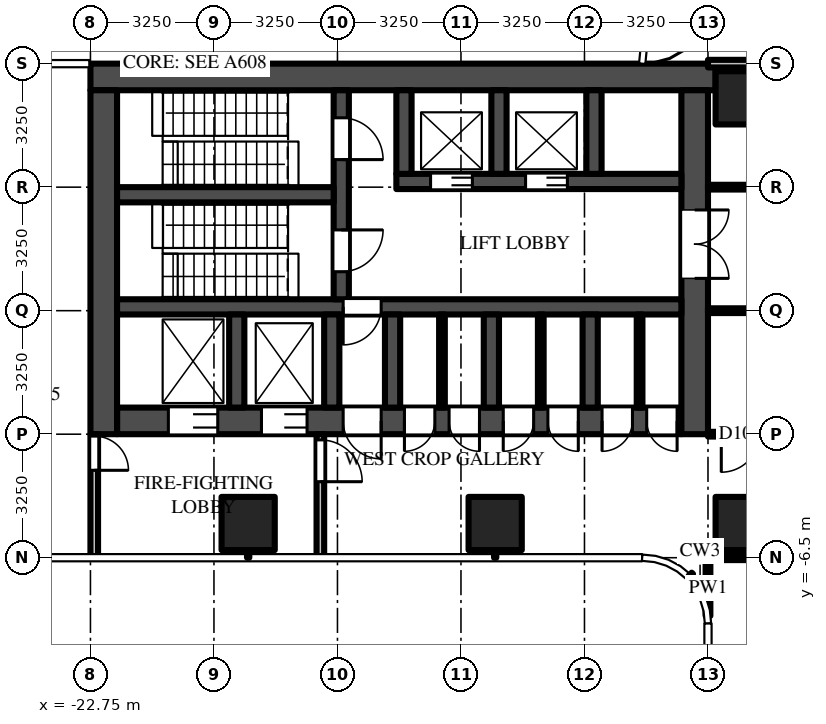
"""IFC4 building model, lengths in metres.
Left out: names, types, materials, properties, quantities, classifications, styles, units other than length and angle.
Written with IfcOpenShell. Run it as: python <this file> out.ifc"""

import sys

from ifc_helpers import new_model, si_unit, direction, frame, frame_2d, origin, origin_2d, place, context, subcontext, project, spatial, rectangle, extrude, source, transform, mapped, element, fill, save


model = new_model("IFC4")
c1 = context("Model", 3, precision=1e-05, world=origin(), true_north=direction((0.0, 1.0)))
c2 = subcontext(c1, "Body", "Model", "MODEL_VIEW")
j1 = project(units=[si_unit("LENGTHUNIT", "METRE"), si_unit("PLANEANGLEUNIT", "RADIAN")], contexts=[c1])
p1 = place(None, origin())
s1 = spatial("IfcSite", under=j1, at=p1, CompositionType="ELEMENT")
p2 = place(p1, origin())
s2 = spatial("IfcBuilding", under=s1, at=p2, CompositionType="ELEMENT")
p3 = place(p2, frame((0.0, 0.0, 47.5)))
s3 = spatial("IfcBuildingStorey", under=s2, at=p3, CompositionType="ELEMENT", Elevation=47.5)
m1 = source(origin(), c2, "Body", "SweptSolid", [
    extrude(rectangle(XDim=1.4, YDim=1.4, at=origin_2d()), origin(), (0.0, 0.0, 1.0), 4.5),
])
for number, where, z_axis, x_axis in (
    (1, (-5.6, 5.6, 0.0), (0.0, 0.0, 1.0), (1.0, 0.0, 0.0)),
    (2, (-5.6, -5.6, 0.0), (0.0, 0.0, 1.0), (1.0, 0.0, 0.0)),
    (3, (-12.1, -5.6, 0.0), (0.0, 0.0, 1.0), (1.0, 0.0, 0.0)),
    (4, (-18.6, -5.6, 0.0), (0.0, 0.0, 1.0), (1.0, 0.0, 0.0)),
):
    element("IfcColumn", number, at=place(p3, frame(where, z_axis=z_axis, x_axis=x_axis)), inside=s3, PredefinedType="COLUMN", context=c2, shape_type="MappedRepresentation", body=[
        mapped(m1, transform((0.0, 0.0, 0.0))),
    ])
m2 = source(origin(), c2, "Body", "SweptSolid", [
    extrude(rectangle(XDim=16.45, YDim=0.7, at=frame_2d((8.225, 0.0))), origin(), (0.0, 0.0, 1.0), 4.25),
])
p4 = place(p3, frame((-6.3, 6.15, 0.0), z_axis=(0.0, 0.0, 1.0), x_axis=(-1.0, 0.0, 0.0)))
e5 = element("IfcWall", 5, at=p4, inside=s3, PredefinedType="SHEAR", context=c2, shape_type="MappedRepresentation", body=[
    mapped(m2, transform((0.0, 0.0, 0.0))),
])
m3 = source(origin(), c2, "Body", "SweptSolid", [
    extrude(rectangle(XDim=14.85, YDim=0.7, at=frame_2d((7.425, 0.0))), origin(), (0.0, 0.0, 1.0), 4.25),
])
p5 = place(p3, frame((-7.2, -2.9, 0.0), z_axis=(0.0, 0.0, 1.0), x_axis=(-1.0, 0.0, 0.0)))
e6 = element("IfcWall", 6, at=p5, inside=s3, PredefinedType="SHEAR", context=c2, shape_type="MappedRepresentation", body=[
    mapped(m3, transform((0.0, 0.0, 0.0))),
])
m4 = source(origin(), c2, "Body", "SweptSolid", [
    extrude(rectangle(XDim=1.3, YDim=2.1, at=frame_2d((0.65, 1.05))), frame((0.0, 0.36, 0.0), z_axis=(0.0, -1.0, 0.0), x_axis=(1.0, 0.0, 0.0)), (0.0, 0.0, 1.0), 0.72),
])
p6 = place(p5, frame((12.2, 0.0, 0.0)))
e7 = element("IfcOpeningElement", 7, at=p6, cuts=e6, PredefinedType="OPENING", context=c2, shape_type="MappedRepresentation", body=[
    mapped(m4, transform((0.0, 0.0, 0.0))),
])
m5 = source(origin(), c2, "Body", "SweptSolid", [
    extrude(rectangle(XDim=1.2, YDim=2.1, at=frame_2d((0.6, 1.05))), frame((0.0, 0.36, 0.0), z_axis=(0.0, -1.0, 0.0), x_axis=(1.0, 0.0, 0.0)), (0.0, 0.0, 1.0), 0.72),
])
p7 = place(p5, frame((9.85, 0.0, 0.0)))
e8 = element("IfcOpeningElement", 8, at=p7, cuts=e6, PredefinedType="OPENING", context=c2, shape_type="MappedRepresentation", body=[
    mapped(m5, transform((0.0, 0.0, 0.0))),
])
m6 = source(origin(), c2, "Body", "SweptSolid", [
    extrude(rectangle(XDim=1.0, YDim=2.1, at=frame_2d((0.5, 1.05))), frame((0.0, 0.36, 0.0), z_axis=(0.0, -1.0, 0.0), x_axis=(1.0, 0.0, 0.0)), (0.0, 0.0, 1.0), 0.72),
])
p8 = place(p5, frame((7.9, 0.0, 0.0)))
e9 = element("IfcOpeningElement", 9, at=p8, cuts=e6, PredefinedType="OPENING", context=c2, shape_type="MappedRepresentation", body=[
    mapped(m6, transform((0.0, 0.0, 0.0))),
])
m7 = source(origin(), c2, "Body", "SweptSolid", [
    extrude(rectangle(XDim=0.8, YDim=2.1, at=frame_2d((0.4, 1.05))), frame((0.0, 0.36, 0.0), z_axis=(0.0, -1.0, 0.0), x_axis=(1.0, 0.0, 0.0)), (0.0, 0.0, 1.0), 0.72),
])
p9 = place(p5, frame((0.113, 0.0, 0.0)))
e10 = element("IfcOpeningElement", 10, at=p9, cuts=e6, PredefinedType="OPENING", context=c2, shape_type="MappedRepresentation", body=[
    mapped(m7, transform((0.0, 0.0, 0.0))),
])
p10 = place(p5, frame((1.288, 0.0, 0.0)))
e11 = element("IfcOpeningElement", 11, at=p10, cuts=e6, PredefinedType="OPENING", context=c2, shape_type="MappedRepresentation", body=[
    mapped(m7, transform((0.0, 0.0, 0.0))),
])
p11 = place(p5, frame((2.712, 0.0, 0.0)))
e12 = element("IfcOpeningElement", 12, at=p11, cuts=e6, PredefinedType="OPENING", context=c2, shape_type="MappedRepresentation", body=[
    mapped(m7, transform((0.0, 0.0, 0.0))),
])
p12 = place(p5, frame((3.887, 0.0, 0.0)))
e13 = element("IfcOpeningElement", 13, at=p12, cuts=e6, PredefinedType="OPENING", context=c2, shape_type="MappedRepresentation", body=[
    mapped(m7, transform((0.0, 0.0, 0.0))),
])
p13 = place(p5, frame((5.312, 0.0, 0.0)))
e14 = element("IfcOpeningElement", 14, at=p13, cuts=e6, PredefinedType="OPENING", context=c2, shape_type="MappedRepresentation", body=[
    mapped(m7, transform((0.0, 0.0, 0.0))),
])
p14 = place(p5, frame((6.488, 0.0, 0.0)))
e15 = element("IfcOpeningElement", 15, at=p14, cuts=e6, PredefinedType="OPENING", context=c2, shape_type="MappedRepresentation", body=[
    mapped(m7, transform((0.0, 0.0, 0.0))),
])
m8 = source(origin(), c2, "Body", "SweptSolid", [
    extrude(rectangle(XDim=9.05, YDim=0.7, at=frame_2d((4.525, 0.0))), origin(), (0.0, 0.0, 1.0), 4.25),
])
p15 = place(p3, frame((-6.85, 5.8, 0.0), z_axis=(0.0, 0.0, 1.0), x_axis=(0.0, -1.0, 0.0)))
e16 = element("IfcWall", 16, at=p15, inside=s3, PredefinedType="SHEAR", context=c2, shape_type="MappedRepresentation", body=[
    mapped(m8, transform((0.0, 0.0, 0.0))),
])
m9 = source(origin(), c2, "Body", "SweptSolid", [
    extrude(rectangle(XDim=1.8, YDim=2.1, at=frame_2d((0.9, 1.05))), frame((0.0, 0.36, 0.0), z_axis=(0.0, -1.0, 0.0), x_axis=(1.0, 0.0, 0.0)), (0.0, 0.0, 1.0), 0.72),
])
p16 = place(p15, frame((3.15, 0.0, 0.0)))
e17 = element("IfcOpeningElement", 17, at=p16, cuts=e16, PredefinedType="OPENING", context=c2, shape_type="MappedRepresentation", body=[
    mapped(m9, transform((0.0, 0.0, 0.0))),
])
p17 = place(p3, frame((-22.4, 5.8, 0.0), z_axis=(0.0, 0.0, 1.0), x_axis=(0.0, -1.0, 0.0)))
e18 = element("IfcWall", 18, at=p17, inside=s3, PredefinedType="SHEAR", context=c2, shape_type="MappedRepresentation", body=[
    mapped(m8, transform((0.0, 0.0, 0.0))),
])
m10 = source(origin(), c2, "Body", "SweptSolid", [
    extrude(rectangle(XDim=7.5, YDim=0.4, at=frame_2d((3.75, 0.0))), origin(), (0.0, 0.0, 1.0), 4.25),
])
p18 = place(p3, frame((-7.2, 3.4, 0.0), z_axis=(0.0, 0.0, 1.0), x_axis=(-1.0, 0.0, 0.0)))
e19 = element("IfcWall", 19, at=p18, inside=s3, PredefinedType="SHEAR", context=c2, shape_type="MappedRepresentation", body=[
    mapped(m10, transform((0.0, 0.0, 0.0))),
])
m11 = source(origin(), c2, "Body", "SweptSolid", [
    extrude(rectangle(XDim=1.1, YDim=2.1, at=frame_2d((0.55, 1.05))), frame((0.0, 0.21, 0.0), z_axis=(0.0, -1.0, 0.0), x_axis=(1.0, 0.0, 0.0)), (0.0, 0.0, 1.0), 0.42),
])
p19 = place(p18, frame((3.0, 0.0, 0.0)))
e20 = element("IfcOpeningElement", 20, at=p19, cuts=e19, PredefinedType="OPENING", context=c2, shape_type="MappedRepresentation", body=[
    mapped(m11, transform((0.0, 0.0, 0.0))),
])
p20 = place(p18, frame((5.5, 0.0, 0.0)))
e21 = element("IfcOpeningElement", 21, at=p20, cuts=e19, PredefinedType="OPENING", context=c2, shape_type="MappedRepresentation", body=[
    mapped(m11, transform((0.0, 0.0, 0.0))),
])
m12 = source(origin(), c2, "Body", "SweptSolid", [
    extrude(rectangle(XDim=14.85, YDim=0.4, at=frame_2d((7.425, 0.0))), origin(), (0.0, 0.0, 1.0), 4.25),
])
p21 = place(p3, frame((-7.2, 0.1, 0.0), z_axis=(0.0, 0.0, 1.0), x_axis=(-1.0, 0.0, 0.0)))
e22 = element("IfcWall", 22, at=p21, inside=s3, PredefinedType="SHEAR", context=c2, shape_type="MappedRepresentation", body=[
    mapped(m12, transform((0.0, 0.0, 0.0))),
])
m13 = source(origin(), c2, "Body", "SweptSolid", [
    extrude(rectangle(XDim=1.0, YDim=2.1, at=frame_2d((0.5, 1.05))), frame((0.0, 0.21, 0.0), z_axis=(0.0, -1.0, 0.0), x_axis=(1.0, 0.0, 0.0)), (0.0, 0.0, 1.0), 0.42),
])
p22 = place(p21, frame((7.9, 0.0, 0.0)))
e23 = element("IfcOpeningElement", 23, at=p22, cuts=e22, PredefinedType="OPENING", context=c2, shape_type="MappedRepresentation", body=[
    mapped(m13, transform((0.0, 0.0, 0.0))),
])
m14 = source(origin(), c2, "Body", "SweptSolid", [
    extrude(rectangle(XDim=5.5, YDim=0.4, at=frame_2d((2.75, 0.0))), origin(), (0.0, 0.0, 1.0), 4.25),
])
p23 = place(p3, frame((-16.15, 5.8, 0.0), z_axis=(0.0, 0.0, 1.0), x_axis=(0.0, -1.0, 0.0)))
e24 = element("IfcWall", 24, at=p23, inside=s3, PredefinedType="SHEAR", context=c2, shape_type="MappedRepresentation", body=[
    mapped(m14, transform((0.0, 0.0, 0.0))),
])
p24 = place(p23, frame((0.725, 0.0, 0.0)))
e25 = element("IfcOpeningElement", 25, at=p24, cuts=e24, PredefinedType="OPENING", context=c2, shape_type="MappedRepresentation", body=[
    mapped(m11, transform((0.0, 0.0, 0.0))),
])
p25 = place(p23, frame((3.675, 0.0, 0.0)))
e26 = element("IfcOpeningElement", 26, at=p25, cuts=e24, PredefinedType="OPENING", context=c2, shape_type="MappedRepresentation", body=[
    mapped(m11, transform((0.0, 0.0, 0.0))),
])
m15 = source(origin(), c2, "Body", "SweptSolid", [
    extrude(rectangle(XDim=5.7, YDim=0.4, at=frame_2d((2.85, 0.0))), origin(), (0.0, 0.0, 1.0), 4.25),
])
p26 = place(p3, frame((-16.35, 3.05, 0.0), z_axis=(0.0, 0.0, 1.0), x_axis=(-1.0, 0.0, 0.0)))
e27 = element("IfcWall", 27, at=p26, inside=s3, PredefinedType="SHEAR", context=c2, shape_type="MappedRepresentation", body=[
    mapped(m15, transform((0.0, 0.0, 0.0))),
])
m16 = source(origin(), c2, "Body", "SweptSolid", [
    extrude(rectangle(XDim=2.2, YDim=0.4, at=frame_2d((1.1, 0.0))), origin(), (0.0, 0.0, 1.0), 4.25),
])
for number, where, z_axis, x_axis in (
    (28, (-9.5, 5.8, 0.0), (0.0, 0.0, 1.0), (0.0, -1.0, 0.0)),
    (29, (-12.0, 5.8, 0.0), (0.0, 0.0, 1.0), (0.0, -1.0, 0.0)),
    (30, (-14.5, 5.8, 0.0), (0.0, 0.0, 1.0), (0.0, -1.0, 0.0)),
):
    element("IfcWall", number, at=place(p3, frame(where, z_axis=z_axis, x_axis=x_axis)), inside=s3, PredefinedType="SHEAR", context=c2, shape_type="MappedRepresentation", body=[
        mapped(m16, transform((0.0, 0.0, 0.0))),
    ])
m17 = source(origin(), c2, "Body", "SweptSolid", [
    extrude(rectangle(XDim=2.45, YDim=0.4, at=frame_2d((1.225, 0.0))), origin(), (0.0, 0.0, 1.0), 4.25),
])
for number, where, z_axis, x_axis in (
    (31, (-9.6, -0.1, 0.0), (0.0, 0.0, 1.0), (0.0, -1.0, 0.0)),
    (32, (-12.2, -0.1, 0.0), (0.0, 0.0, 1.0), (0.0, -1.0, 0.0)),
    (33, (-14.8, -0.1, 0.0), (0.0, 0.0, 1.0), (0.0, -1.0, 0.0)),
    (34, (-16.4, -0.1, 0.0), (0.0, 0.0, 1.0), (0.0, -1.0, 0.0)),
    (35, (-18.9, -0.1, 0.0), (0.0, 0.0, 1.0), (0.0, -1.0, 0.0)),
):
    element("IfcWall", number, at=place(p3, frame(where, z_axis=z_axis, x_axis=x_axis)), inside=s3, PredefinedType="SHEAR", context=c2, shape_type="MappedRepresentation", body=[
        mapped(m17, transform((0.0, 0.0, 0.0))),
    ])
m18 = source(origin(), c2, "Body", "SweptSolid", [
    extrude(rectangle(XDim=3.25, YDim=0.2, at=frame_2d((1.625, 0.0))), origin(), (0.0, 0.0, 1.0), 4.25),
])
p27 = place(p3, frame((-16.7, -3.25, 0.0), z_axis=(0.0, 0.0, 1.0), x_axis=(0.0, -1.0, 0.0)))
e36 = element("IfcWall", 36, at=p27, inside=s3, PredefinedType="PARTITIONING", context=c2, shape_type="MappedRepresentation", body=[
    mapped(m18, transform((0.0, 0.0, 0.0))),
])
m19 = source(origin(), c2, "Body", "SweptSolid", [
    extrude(rectangle(XDim=1.1, YDim=2.1, at=frame_2d((0.55, 1.05))), frame((0.0, 0.11, 0.0), z_axis=(0.0, -1.0, 0.0), x_axis=(1.0, 0.0, 0.0)), (0.0, 0.0, 1.0), 0.22),
])
p28 = place(p27, frame((0.15, 0.0, 0.0)))
e37 = element("IfcOpeningElement", 37, at=p28, cuts=e36, PredefinedType="OPENING", context=c2, shape_type="MappedRepresentation", body=[
    mapped(m19, transform((0.0, 0.0, 0.0))),
])
p29 = place(p3, frame((-22.65, -3.25, 0.0), z_axis=(0.0, 0.0, 1.0), x_axis=(0.0, -1.0, 0.0)))
e38 = element("IfcWall", 38, at=p29, inside=s3, PredefinedType="PARTITIONING", context=c2, shape_type="MappedRepresentation", body=[
    mapped(m18, transform((0.0, 0.0, 0.0))),
])
m20 = source(origin(), c2, "Body", "SweptSolid", [
    extrude(rectangle(XDim=0.9, YDim=2.1, at=frame_2d((0.45, 1.05))), frame((0.0, 0.11, 0.0), z_axis=(0.0, -1.0, 0.0), x_axis=(1.0, 0.0, 0.0)), (0.0, 0.0, 1.0), 0.22),
])
p30 = place(p29, frame((0.05, 0.0, 0.0)))
e39 = element("IfcOpeningElement", 39, at=p30, cuts=e38, PredefinedType="OPENING", context=c2, shape_type="MappedRepresentation", body=[
    mapped(m20, transform((0.0, 0.0, 0.0))),
])
m21 = source(origin(), c2, "Body", "SweptSolid", [
    extrude(rectangle(XDim=2.45, YDim=0.15, at=frame_2d((1.225, 0.0))), origin(), (0.0, 0.0, 1.0), 4.25),
])
for number, where, z_axis, x_axis in (
    (40, (-8.3, -0.1, 0.0), (0.0, 0.0, 1.0), (0.0, -1.0, 0.0)),
    (41, (-10.9, -0.1, 0.0), (0.0, 0.0, 1.0), (0.0, -1.0, 0.0)),
    (42, (-13.5, -0.1, 0.0), (0.0, 0.0, 1.0), (0.0, -1.0, 0.0)),
):
    element("IfcWall", number, at=place(p3, frame(where, z_axis=z_axis, x_axis=x_axis)), inside=s3, PredefinedType="PARTITIONING", context=c2, shape_type="MappedRepresentation", body=[
        mapped(m21, transform((0.0, 0.0, 0.0))),
    ])
m22 = source(origin(), c2, "Body", "SweptSolid", [
    extrude(rectangle(XDim=1.469, YDim=0.125, at=frame_2d((0.734, 0.0))), origin(), (0.0, 0.0, 1.0), 4.25),
])
p31 = place(p3, frame((-6.5, -6.562, 0.0), z_axis=(0.0, 0.0, 1.0), x_axis=(0.0, -1.0, 0.0)))
e43 = element("IfcWall", 43, at=p31, inside=s3, PredefinedType="PARTITIONING", context=c2, shape_type="MappedRepresentation", body=[
    mapped(m22, transform((0.0, 0.0, 0.0))),
])
m23 = source(origin(), c2, "Body", "SweptSolid", [
    extrude(rectangle(XDim=5.425, YDim=0.125, at=frame_2d((2.712, 0.0))), origin(), (0.0, 0.0, 1.0), 3.33),
])
p32 = place(p3, frame((-1.137, -6.5, 0.0), z_axis=(0.0, 0.0, 1.0), x_axis=(-1.0, 0.0, 0.0)))
e44 = element("IfcWall", 44, at=p32, inside=s3, PredefinedType="PARTITIONING", context=c2, shape_type="MappedRepresentation", body=[
    mapped(m23, transform((0.0, 0.0, 0.0))),
])
m24 = source(origin(), c2, "Body", "SweptSolid", [
    extrude(rectangle(XDim=1.0, YDim=2.1, at=frame_2d((0.5, 1.05))), frame((0.0, 0.073, 0.0), z_axis=(0.0, -1.0, 0.0), x_axis=(1.0, 0.0, 0.0)), (0.0, 0.0, 1.0), 0.145),
])
p33 = place(p32, frame((2.712, 0.0, 0.0)))
e45 = element("IfcOpeningElement", 45, at=p33, cuts=e44, PredefinedType="OPENING", context=c2, shape_type="MappedRepresentation", body=[
    mapped(m24, transform((0.0, 0.0, 0.0))),
])
m25 = source(origin(), c2, "Body", "SweptSolid", [
    extrude(rectangle(XDim=5.363, YDim=0.125, at=frame_2d((2.681, 0.0))), origin(), (0.0, 0.0, 1.0), 3.468),
])
p34 = place(p3, frame((-1.137, -3.25, 0.0), z_axis=(0.0, 0.0, 1.0), x_axis=(-1.0, 0.0, 0.0)))
e46 = element("IfcWall", 46, at=p34, inside=s3, PredefinedType="PARTITIONING", context=c2, shape_type="MappedRepresentation", body=[
    mapped(m25, transform((0.0, 0.0, 0.0))),
])
p35 = place(p34, frame((4.012, 0.0, 0.0)))
e47 = element("IfcOpeningElement", 47, at=p35, cuts=e46, PredefinedType="OPENING", context=c2, shape_type="MappedRepresentation", body=[
    mapped(m24, transform((0.0, 0.0, 0.0))),
])
p36 = place(p3, frame((-1.137, 0.0, 0.0), z_axis=(0.0, 0.0, 1.0), x_axis=(-1.0, 0.0, 0.0)))
e48 = element("IfcWall", 48, at=p36, inside=s3, PredefinedType="PARTITIONING", context=c2, shape_type="MappedRepresentation", body=[
    mapped(m25, transform((0.0, 0.0, 0.0))),
])
p37 = place(p3, frame((-6.5, 3.25, 0.0), z_axis=(0.0, 0.0, 1.0), x_axis=(1.0, 0.0, 0.0)))
e49 = element("IfcWall", 49, at=p37, inside=s3, PredefinedType="PARTITIONING", context=c2, shape_type="MappedRepresentation", body=[
    mapped(m25, transform((0.0, 0.0, 0.0))),
])
p38 = place(p37, frame((3.95, 0.0, 0.0)))
e50 = element("IfcOpeningElement", 50, at=p38, cuts=e49, PredefinedType="OPENING", context=c2, shape_type="MappedRepresentation", body=[
    mapped(m24, transform((0.0, 0.0, 0.0))),
])
m26 = source(origin(), c2, "Body", "SweptSolid", [
    extrude(rectangle(XDim=5.363, YDim=0.2, at=frame_2d((2.681, 0.0))), origin(), (0.0, 0.0, 1.0), 3.33),
])
p39 = place(p3, frame((-6.5, 6.5, 0.0), z_axis=(0.0, 0.0, 1.0), x_axis=(1.0, 0.0, 0.0)))
e51 = element("IfcWall", 51, at=p39, inside=s3, PredefinedType="PARTITIONING", context=c2, shape_type="MappedRepresentation", body=[
    mapped(m26, transform((0.0, 0.0, 0.0))),
])
m27 = source(origin(), c2, "Body", "SweptSolid", [
    extrude(rectangle(XDim=1.1, YDim=2.1, at=frame_2d((0.55, 1.05))), frame((0.0, 0.025, 0.0), z_axis=(0.0, -1.0, 0.0), x_axis=(1.0, 0.0, 0.0)), (0.0, 0.0, 1.0), 0.05),
])
p40 = place(p19, origin())
e52 = element("IfcDoor", 52, at=p40, inside=s3, OperationType="DOUBLE_DOOR_SLIDING", PredefinedType="DOOR", context=c2, shape_type="MappedRepresentation", body=[
    mapped(m27, transform((0.0, 0.0, 0.0))),
])
fill(e20, e52)
p41 = place(p20, origin())
e53 = element("IfcDoor", 53, at=p41, inside=s3, OperationType="DOUBLE_DOOR_SLIDING", PredefinedType="DOOR", context=c2, shape_type="MappedRepresentation", body=[
    mapped(m27, transform((0.0, 0.0, 0.0))),
])
fill(e21, e53)
m28 = source(origin(), c2, "Body", "SweptSolid", [
    extrude(rectangle(XDim=1.3, YDim=2.1, at=frame_2d((0.65, 1.05))), frame((0.0, -0.275, 0.0), z_axis=(0.0, -1.0, 0.0), x_axis=(1.0, 0.0, 0.0)), (0.0, 0.0, 1.0), 0.05),
])
p42 = place(p6, origin())
e54 = element("IfcDoor", 54, at=p42, inside=s3, OperationType="DOUBLE_DOOR_SLIDING", PredefinedType="DOOR", context=c2, shape_type="MappedRepresentation", body=[
    mapped(m28, transform((0.0, 0.0, 0.0))),
])
fill(e7, e54)
m29 = source(origin(), c2, "Body", "SweptSolid", [
    extrude(rectangle(XDim=1.2, YDim=2.1, at=frame_2d((0.6, 1.05))), frame((0.0, -0.275, 0.0), z_axis=(0.0, -1.0, 0.0), x_axis=(1.0, 0.0, 0.0)), (0.0, 0.0, 1.0), 0.05),
])
p43 = place(p7, origin())
e55 = element("IfcDoor", 55, at=p43, inside=s3, OperationType="DOUBLE_DOOR_SLIDING", PredefinedType="DOOR", context=c2, shape_type="MappedRepresentation", body=[
    mapped(m29, transform((0.0, 0.0, 0.0))),
])
fill(e8, e55)
m30 = source(origin(), c2, "Body", "SweptSolid", [
    extrude(rectangle(XDim=1.8, YDim=2.1, at=frame_2d((0.9, 1.05))), frame((0.0, -0.275, 0.0), z_axis=(0.0, -1.0, 0.0), x_axis=(1.0, 0.0, 0.0)), (0.0, 0.0, 1.0), 0.05),
])
p44 = place(p16, origin())
e56 = element("IfcDoor", 56, at=p44, inside=s3, OperationType="DOUBLE_DOOR_SINGLE_SWING", PredefinedType="DOOR", context=c2, shape_type="MappedRepresentation", body=[
    mapped(m30, transform((0.0, 0.0, 0.0))),
])
fill(e17, e56)
p45 = place(p24, origin())
e57 = element("IfcDoor", 57, at=p45, inside=s3, OperationType="SINGLE_SWING_RIGHT", PredefinedType="DOOR", context=c2, shape_type="MappedRepresentation", body=[
    mapped(m27, transform((0.0, 0.0, 0.0))),
])
fill(e25, e57)
p46 = place(p25, origin())
e58 = element("IfcDoor", 58, at=p46, inside=s3, OperationType="SINGLE_SWING_LEFT", PredefinedType="DOOR", context=c2, shape_type="MappedRepresentation", body=[
    mapped(m27, transform((0.0, 0.0, 0.0))),
])
fill(e26, e58)
m31 = source(origin(), c2, "Body", "SweptSolid", [
    extrude(rectangle(XDim=1.0, YDim=2.1, at=frame_2d((0.5, 1.05))), frame((0.0, 0.025, 0.0), z_axis=(0.0, -1.0, 0.0), x_axis=(1.0, 0.0, 0.0)), (0.0, 0.0, 1.0), 0.05),
])
p47 = place(p22, origin())
e59 = element("IfcDoor", 59, at=p47, inside=s3, OperationType="SINGLE_SWING_RIGHT", PredefinedType="DOOR", context=c2, shape_type="MappedRepresentation", body=[
    mapped(m31, transform((0.0, 0.0, 0.0))),
])
fill(e23, e59)
m32 = source(origin(), c2, "Body", "SweptSolid", [
    extrude(rectangle(XDim=1.0, YDim=2.1, at=frame_2d((0.5, 1.05))), frame((0.0, -0.275, 0.0), z_axis=(0.0, -1.0, 0.0), x_axis=(1.0, 0.0, 0.0)), (0.0, 0.0, 1.0), 0.05),
])
p48 = place(p8, origin())
e60 = element("IfcDoor", 60, at=p48, inside=s3, OperationType="SINGLE_SWING_LEFT", PredefinedType="DOOR", context=c2, shape_type="MappedRepresentation", body=[
    mapped(m32, transform((0.0, 0.0, 0.0))),
])
fill(e9, e60)
p49 = place(p28, origin())
e61 = element("IfcDoor", 61, at=p49, inside=s3, OperationType="SINGLE_SWING_RIGHT", PredefinedType="DOOR", context=c2, shape_type="MappedRepresentation", body=[
    mapped(m27, transform((0.0, 0.0, 0.0))),
])
fill(e37, e61)
m33 = source(origin(), c2, "Body", "SweptSolid", [
    extrude(rectangle(XDim=0.9, YDim=2.1, at=frame_2d((0.45, 1.05))), frame((0.0, 0.025, 0.0), z_axis=(0.0, -1.0, 0.0), x_axis=(1.0, 0.0, 0.0)), (0.0, 0.0, 1.0), 0.05),
])
p50 = place(p30, origin())
e62 = element("IfcDoor", 62, at=p50, inside=s3, OperationType="SINGLE_SWING_RIGHT", PredefinedType="DOOR", context=c2, shape_type="MappedRepresentation", body=[
    mapped(m33, transform((0.0, 0.0, 0.0))),
])
fill(e39, e62)
m34 = source(origin(), c2, "Body", "SweptSolid", [
    extrude(rectangle(XDim=0.8, YDim=2.1, at=frame_2d((0.4, 1.05))), frame((0.0, -0.275, 0.0), z_axis=(0.0, -1.0, 0.0), x_axis=(1.0, 0.0, 0.0)), (0.0, 0.0, 1.0), 0.05),
])
p51 = place(p9, origin())
e63 = element("IfcDoor", 63, at=p51, inside=s3, OperationType="SINGLE_SWING_LEFT", PredefinedType="DOOR", context=c2, shape_type="MappedRepresentation", body=[
    mapped(m34, transform((0.0, 0.0, 0.0))),
])
fill(e10, e63)
p52 = place(p10, origin())
e64 = element("IfcDoor", 64, at=p52, inside=s3, OperationType="SINGLE_SWING_RIGHT", PredefinedType="DOOR", context=c2, shape_type="MappedRepresentation", body=[
    mapped(m34, transform((0.0, 0.0, 0.0))),
])
fill(e11, e64)
p53 = place(p11, origin())
e65 = element("IfcDoor", 65, at=p53, inside=s3, OperationType="SINGLE_SWING_LEFT", PredefinedType="DOOR", context=c2, shape_type="MappedRepresentation", body=[
    mapped(m34, transform((0.0, 0.0, 0.0))),
])
fill(e12, e65)
p54 = place(p12, origin())
e66 = element("IfcDoor", 66, at=p54, inside=s3, OperationType="SINGLE_SWING_RIGHT", PredefinedType="DOOR", context=c2, shape_type="MappedRepresentation", body=[
    mapped(m34, transform((0.0, 0.0, 0.0))),
])
fill(e13, e66)
p55 = place(p13, origin())
e67 = element("IfcDoor", 67, at=p55, inside=s3, OperationType="SINGLE_SWING_LEFT", PredefinedType="DOOR", context=c2, shape_type="MappedRepresentation", body=[
    mapped(m34, transform((0.0, 0.0, 0.0))),
])
fill(e14, e67)
p56 = place(p14, origin())
e68 = element("IfcDoor", 68, at=p56, inside=s3, OperationType="SINGLE_SWING_RIGHT", PredefinedType="DOOR", context=c2, shape_type="MappedRepresentation", body=[
    mapped(m34, transform((0.0, 0.0, 0.0))),
])
fill(e15, e68)
p57 = place(p35, origin())
e69 = element("IfcDoor", 69, at=p57, inside=s3, OperationType="SINGLE_SWING_RIGHT", PredefinedType="DOOR", context=c2, shape_type="MappedRepresentation", body=[
    mapped(m31, transform((0.0, 0.0, 0.0))),
])
fill(e47, e69)
save(model, sys.argv[1])
